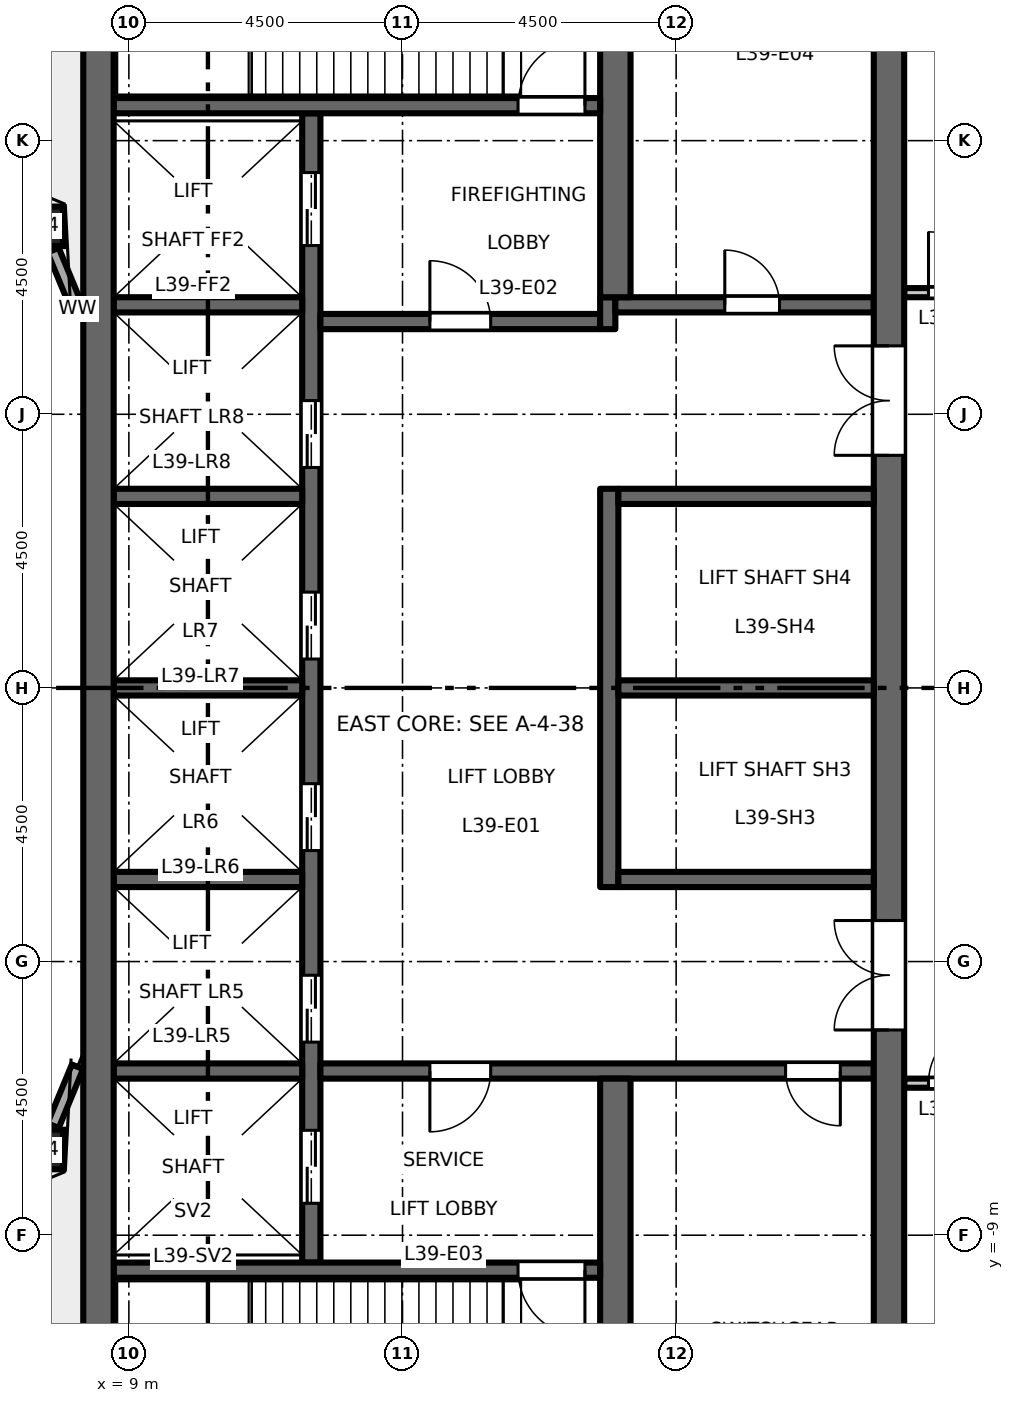
"""IFC4 building model, lengths in metres.
Left out: names, types, materials, properties, quantities, classifications, styles, units other than length and angle.
Written with IfcOpenShell. Run it as: python <this file> out.ifc"""

import sys

from ifc_helpers import new_model, si_unit, direction, frame, frame_2d, origin, origin_2d, place, context, subcontext, project, spatial, rectangle, hollow_rectangle, extrude, element, fill, save


model = new_model("IFC4")
c1 = context("Model", 3, precision=1e-05, world=origin(), true_north=direction((0.0, 1.0)))
c2 = subcontext(c1, "Body", "Model", "MODEL_VIEW")
j1 = project(units=[si_unit("LENGTHUNIT", "METRE"), si_unit("PLANEANGLEUNIT", "RADIAN")], contexts=[c1])
p1 = place(None, origin())
s1 = spatial("IfcSite", under=j1, at=p1, CompositionType="ELEMENT")
p2 = place(p1, origin())
s2 = spatial("IfcBuilding", under=s1, at=p2, CompositionType="ELEMENT")
p3 = place(p2, frame((0.0, 0.0, 181.2)))
s3 = spatial("IfcBuildingStorey", under=s2, at=p3, CompositionType="ELEMENT", Elevation=181.2)
for number, where, z_axis, x_axis in (
    (1, (7.591, -7.591, 0.0), (0.0, 0.0, 1.0), (1.0, 0.0, 0.0)),
    (2, (7.591, 7.591, 0.0), (0.0, 0.0, 1.0), (1.0, 0.0, 0.0)),
):
    element("IfcColumn", number, at=place(p3, frame(where, z_axis=z_axis, x_axis=x_axis)), inside=s3, PredefinedType="COLUMN", context=c2, shape_type="SweptSolid", body=[
        extrude(hollow_rectangle(XDim=0.65, YDim=0.65, WallThickness=0.036, at=origin_2d()), origin(), (0.0, 0.0, 1.0), 6.0),
    ])
p4 = place(p3, frame((12.0, -9.45, 0.0), z_axis=(0.0, 0.0, 1.0), x_axis=(0.0, 1.0, 0.0)))
e3 = element("IfcWall", 3, at=p4, inside=s3, PredefinedType="SHEAR", context=c2, shape_type="SweptSolid", body=[
    extrude(rectangle(XDim=18.9, YDim=0.3, at=frame_2d((9.45, 0.0))), origin(), (0.0, 0.0, 1.0), 5.8),
])
p5 = place(p4, frame((3.625, 0.0, 0.0)))
e4 = element("IfcOpeningElement", 4, at=p5, cuts=e3, PredefinedType="OPENING", context=c2, shape_type="SweptSolid", body=[
    extrude(rectangle(XDim=1.1, YDim=2.1, at=frame_2d((0.55, 1.05))), frame((0.0, 0.16, 0.0), z_axis=(0.0, -1.0, 0.0), x_axis=(1.0, 0.0, 0.0)), (0.0, 0.0, 1.0), 0.32),
])
p6 = place(p4, frame((6.775, 0.0, 0.0)))
e5 = element("IfcOpeningElement", 5, at=p6, cuts=e3, PredefinedType="OPENING", context=c2, shape_type="SweptSolid", body=[
    extrude(rectangle(XDim=1.1, YDim=2.1, at=frame_2d((0.55, 1.05))), frame((0.0, 0.16, 0.0), z_axis=(0.0, -1.0, 0.0), x_axis=(1.0, 0.0, 0.0)), (0.0, 0.0, 1.0), 0.32),
])
p7 = place(p4, frame((9.925, 0.0, 0.0)))
e6 = element("IfcOpeningElement", 6, at=p7, cuts=e3, PredefinedType="OPENING", context=c2, shape_type="SweptSolid", body=[
    extrude(rectangle(XDim=1.1, YDim=2.1, at=frame_2d((0.55, 1.05))), frame((0.0, 0.16, 0.0), z_axis=(0.0, -1.0, 0.0), x_axis=(1.0, 0.0, 0.0)), (0.0, 0.0, 1.0), 0.32),
])
p8 = place(p4, frame((13.075, 0.0, 0.0)))
e7 = element("IfcOpeningElement", 7, at=p8, cuts=e3, PredefinedType="OPENING", context=c2, shape_type="SweptSolid", body=[
    extrude(rectangle(XDim=1.1, YDim=2.1, at=frame_2d((0.55, 1.05))), frame((0.0, 0.16, 0.0), z_axis=(0.0, -1.0, 0.0), x_axis=(1.0, 0.0, 0.0)), (0.0, 0.0, 1.0), 0.32),
])
p9 = place(p4, frame((16.725, 0.0, 0.0)))
e8 = element("IfcOpeningElement", 8, at=p9, cuts=e3, PredefinedType="OPENING", context=c2, shape_type="SweptSolid", body=[
    extrude(rectangle(XDim=1.2, YDim=2.1, at=frame_2d((0.6, 1.05))), frame((0.0, 0.16, 0.0), z_axis=(0.0, -1.0, 0.0), x_axis=(1.0, 0.0, 0.0)), (0.0, 0.0, 1.0), 0.32),
])
p10 = place(p4, frame((0.975, 0.0, 0.0)))
e9 = element("IfcOpeningElement", 9, at=p10, cuts=e3, PredefinedType="OPENING", context=c2, shape_type="SweptSolid", body=[
    extrude(rectangle(XDim=1.2, YDim=2.1, at=frame_2d((0.6, 1.05))), frame((0.0, 0.16, 0.0), z_axis=(0.0, -1.0, 0.0), x_axis=(1.0, 0.0, 0.0)), (0.0, 0.0, 1.0), 0.32),
])
p11 = place(p3, frame((12.15, 6.025, 0.0), z_axis=(0.0, 0.0, 1.0), x_axis=(1.0, 0.0, 0.0)))
e10 = element("IfcWall", 10, at=p11, inside=s3, PredefinedType="SHEAR", context=c2, shape_type="SweptSolid", body=[
    extrude(rectangle(XDim=4.6, YDim=0.25, at=frame_2d((2.3, 0.0))), origin(), (0.0, 0.0, 1.0), 5.8),
])
p12 = place(p11, frame((1.8, 0.0, 0.0)))
e11 = element("IfcOpeningElement", 11, at=p12, cuts=e10, PredefinedType="OPENING", context=c2, shape_type="SweptSolid", body=[
    extrude(rectangle(XDim=1.0, YDim=2.1, at=frame_2d((0.5, 1.05))), frame((0.0, 0.135, 0.0), z_axis=(0.0, -1.0, 0.0), x_axis=(1.0, 0.0, 0.0)), (0.0, 0.0, 1.0), 0.27),
])
p13 = place(p3, frame((16.875, 5.9, 0.0), z_axis=(0.0, 0.0, 1.0), x_axis=(0.0, 1.0, 0.0)))
e12 = element("IfcWall", 12, at=p13, inside=s3, PredefinedType="SHEAR", context=c2, shape_type="SweptSolid", body=[
    extrude(rectangle(XDim=0.525, YDim=0.25, at=frame_2d((0.263, 0.0))), origin(), (0.0, 0.0, 1.0), 5.8),
])
p14 = place(p3, frame((17.0, 6.3, 0.0), z_axis=(0.0, 0.0, 1.0), x_axis=(1.0, 0.0, 0.0)))
e13 = element("IfcWall", 13, at=p14, inside=s3, PredefinedType="SHEAR", context=c2, shape_type="SweptSolid", body=[
    extrude(rectangle(XDim=4.25, YDim=0.25, at=frame_2d((2.125, 0.0))), origin(), (0.0, 0.0, 1.0), 5.8),
])
p15 = place(p14, frame((1.8, 0.0, 0.0)))
e14 = element("IfcOpeningElement", 14, at=p15, cuts=e13, PredefinedType="OPENING", context=c2, shape_type="SweptSolid", body=[
    extrude(rectangle(XDim=0.9, YDim=2.1, at=frame_2d((0.45, 1.05))), frame((0.0, 0.135, 0.0), z_axis=(0.0, -1.0, 0.0), x_axis=(1.0, 0.0, 0.0)), (0.0, 0.0, 1.0), 0.27),
])
p16 = place(p3, frame((12.15, -6.3, 0.0), z_axis=(0.0, 0.0, 1.0), x_axis=(1.0, 0.0, 0.0)))
e15 = element("IfcWall", 15, at=p16, inside=s3, PredefinedType="SHEAR", context=c2, shape_type="SweptSolid", body=[
    extrude(rectangle(XDim=9.1, YDim=0.25, at=frame_2d((4.55, 0.0))), origin(), (0.0, 0.0, 1.0), 5.8),
])
p17 = place(p16, frame((1.8, 0.0, 0.0)))
e16 = element("IfcOpeningElement", 16, at=p17, cuts=e15, PredefinedType="OPENING", context=c2, shape_type="SweptSolid", body=[
    extrude(rectangle(XDim=1.0, YDim=2.1, at=frame_2d((0.5, 1.05))), frame((0.0, 0.135, 0.0), z_axis=(0.0, -1.0, 0.0), x_axis=(1.0, 0.0, 0.0)), (0.0, 0.0, 1.0), 0.27),
])
p18 = place(p16, frame((7.65, 0.0, 0.0)))
e17 = element("IfcOpeningElement", 17, at=p18, cuts=e15, PredefinedType="OPENING", context=c2, shape_type="SweptSolid", body=[
    extrude(rectangle(XDim=0.9, YDim=2.1, at=frame_2d((0.45, 1.05))), frame((0.0, 0.135, 0.0), z_axis=(0.0, -1.0, 0.0), x_axis=(1.0, 0.0, 0.0)), (0.0, 0.0, 1.0), 0.27),
])
p19 = place(p3, frame((21.5, -13.0, 0.0), z_axis=(0.0, 0.0, 1.0), x_axis=(0.0, 1.0, 0.0)))
e18 = element("IfcWall", 18, at=p19, inside=s3, PredefinedType="SHEAR", context=c2, shape_type="SweptSolid", body=[
    extrude(rectangle(XDim=26.0, YDim=0.5, at=frame_2d((13.0, 0.0))), origin(), (0.0, 0.0, 1.0), 5.8),
])
p20 = place(p19, frame((16.825, 0.0, 0.0)))
e19 = element("IfcOpeningElement", 19, at=p20, cuts=e18, PredefinedType="OPENING", context=c2, shape_type="SweptSolid", body=[
    extrude(rectangle(XDim=1.8, YDim=2.1, at=frame_2d((0.9, 1.05))), frame((0.0, 0.26, 0.0), z_axis=(0.0, -1.0, 0.0), x_axis=(1.0, 0.0, 0.0)), (0.0, 0.0, 1.0), 0.52),
])
p21 = place(p19, frame((7.375, 0.0, 0.0)))
e20 = element("IfcOpeningElement", 20, at=p21, cuts=e18, PredefinedType="OPENING", context=c2, shape_type="SweptSolid", body=[
    extrude(rectangle(XDim=1.8, YDim=2.1, at=frame_2d((0.9, 1.05))), frame((0.0, 0.26, 0.0), z_axis=(0.0, -1.0, 0.0), x_axis=(1.0, 0.0, 0.0)), (0.0, 0.0, 1.0), 0.52),
])
p22 = place(p3, frame((16.9, -3.275, 0.0), z_axis=(0.0, 0.0, 1.0), x_axis=(0.0, 1.0, 0.0)))
e21 = element("IfcWall", 21, at=p22, inside=s3, PredefinedType="SHEAR", context=c2, shape_type="SweptSolid", body=[
    extrude(rectangle(XDim=6.55, YDim=0.3, at=frame_2d((3.275, 0.0))), origin(), (0.0, 0.0, 1.0), 5.8),
])
for number, where, z_axis, x_axis in (
    (22, (17.05, 0.0, 0.0), (0.0, 0.0, 1.0), (1.0, 0.0, 0.0)),
    (23, (17.05, 3.15, 0.0), (0.0, 0.0, 1.0), (1.0, 0.0, 0.0)),
    (24, (17.05, -3.15, 0.0), (0.0, 0.0, 1.0), (1.0, 0.0, 0.0)),
):
    element("IfcWall", number, at=place(p3, frame(where, z_axis=z_axis, x_axis=x_axis)), inside=s3, PredefinedType="SHEAR", context=c2, shape_type="SweptSolid", body=[
        extrude(rectangle(XDim=4.2, YDim=0.25, at=frame_2d((2.1, 0.0))), origin(), (0.0, 0.0, 1.0), 5.8),
    ])
for number, where, z_axis, x_axis in (
    (25, (17.0, 6.425, 0.0), (0.0, 0.0, 1.0), (0.0, 1.0, 0.0)),
    (26, (17.0, -13.0, 0.0), (0.0, 0.0, 1.0), (0.0, 1.0, 0.0)),
):
    element("IfcWall", number, at=place(p3, frame(where, z_axis=z_axis, x_axis=x_axis)), inside=s3, PredefinedType="SHEAR", context=c2, shape_type="SweptSolid", body=[
        extrude(rectangle(XDim=6.575, YDim=0.5, at=frame_2d((3.288, 0.0))), origin(), (0.0, 0.0, 1.0), 5.8),
    ])
for number, where, z_axis, x_axis in (
    (27, (8.75, 0.0, 0.0), (0.0, 0.0, 1.0), (1.0, 0.0, 0.0)),
    (28, (8.75, 3.15, 0.0), (0.0, 0.0, 1.0), (1.0, 0.0, 0.0)),
    (29, (8.75, 6.3, 0.0), (0.0, 0.0, 1.0), (1.0, 0.0, 0.0)),
    (30, (8.75, -3.15, 0.0), (0.0, 0.0, 1.0), (1.0, 0.0, 0.0)),
    (31, (8.75, -6.3, 0.0), (0.0, 0.0, 1.0), (1.0, 0.0, 0.0)),
):
    element("IfcWall", number, at=place(p3, frame(where, z_axis=z_axis, x_axis=x_axis)), inside=s3, PredefinedType="SHEAR", context=c2, shape_type="SweptSolid", body=[
        extrude(rectangle(XDim=3.1, YDim=0.25, at=frame_2d((1.55, 0.0))), origin(), (0.0, 0.0, 1.0), 5.8),
    ])
p23 = place(p3, frame((8.75, 9.575, 0.0), z_axis=(0.0, 0.0, 1.0), x_axis=(1.0, 0.0, 0.0)))
e32 = element("IfcWall", 32, at=p23, inside=s3, PredefinedType="SHEAR", context=c2, shape_type="SweptSolid", body=[
    extrude(rectangle(XDim=8.0, YDim=0.25, at=frame_2d((4.0, 0.0))), origin(), (0.0, 0.0, 1.0), 5.8),
])
p24 = place(p23, frame((6.65, 0.0, 0.0)))
e33 = element("IfcOpeningElement", 33, at=p24, cuts=e32, PredefinedType="OPENING", context=c2, shape_type="SweptSolid", body=[
    extrude(rectangle(XDim=1.1, YDim=2.1, at=frame_2d((0.55, 1.05))), frame((0.0, 0.135, 0.0), z_axis=(0.0, -1.0, 0.0), x_axis=(1.0, 0.0, 0.0)), (0.0, 0.0, 1.0), 0.27),
])
p25 = place(p3, frame((8.75, -9.575, 0.0), z_axis=(0.0, 0.0, 1.0), x_axis=(1.0, 0.0, 0.0)))
e34 = element("IfcWall", 34, at=p25, inside=s3, PredefinedType="SHEAR", context=c2, shape_type="SweptSolid", body=[
    extrude(rectangle(XDim=8.0, YDim=0.25, at=frame_2d((4.0, 0.0))), origin(), (0.0, 0.0, 1.0), 5.8),
])
p26 = place(p25, frame((6.65, 0.0, 0.0)))
e35 = element("IfcOpeningElement", 35, at=p26, cuts=e34, PredefinedType="OPENING", context=c2, shape_type="SweptSolid", body=[
    extrude(rectangle(XDim=1.1, YDim=2.1, at=frame_2d((0.55, 1.05))), frame((0.0, 0.135, 0.0), z_axis=(0.0, -1.0, 0.0), x_axis=(1.0, 0.0, 0.0)), (0.0, 0.0, 1.0), 0.27),
])
p27 = place(p3, frame((8.5, -13.0, 0.0), z_axis=(0.0, 0.0, 1.0), x_axis=(0.0, 1.0, 0.0)))
e36 = element("IfcWall", 36, at=p27, inside=s3, PredefinedType="SHEAR", context=c2, shape_type="SweptSolid", body=[
    extrude(rectangle(XDim=26.0, YDim=0.5, at=frame_2d((13.0, 0.0))), origin(), (0.0, 0.0, 1.0), 5.8),
])
for number, where, z_axis, x_axis in (
    (37, (7.753, -7.199, 0.0), (0.0, 0.0, 1.0), (0.383, 0.924, 0.0)),
    (38, (8.154, 6.231, 0.0), (0.0, 0.0, 1.0), (-0.383, 0.924, 0.0)),
):
    element("IfcWall", number, at=place(p3, frame(where, z_axis=z_axis, x_axis=x_axis)), inside=s3, PredefinedType="STANDARD", context=c2, shape_type="SweptSolid", body=[
        extrude(rectangle(XDim=1.048, YDim=0.2, at=frame_2d((0.524, 0.0))), origin(), (0.0, 0.0, 1.0), 5.368),
    ])
p28 = place(p3, frame((21.75, -6.5, 0.0), z_axis=(0.0, 0.0, 1.0), x_axis=(1.0, 0.0, 0.0)))
e39 = element("IfcWall", 39, at=p28, inside=s3, PredefinedType="PARTITIONING", context=c2, shape_type="SweptSolid", body=[
    extrude(rectangle(XDim=4.575, YDim=0.15, at=frame_2d((2.288, 0.0))), origin(), (0.0, 0.0, 1.0), 5.8),
])
p29 = place(p28, frame((0.4, 0.0, 0.0)))
e40 = element("IfcOpeningElement", 40, at=p29, cuts=e39, PredefinedType="OPENING", context=c2, shape_type="SweptSolid", body=[
    extrude(rectangle(XDim=1.0, YDim=2.1, at=frame_2d((0.5, 1.05))), frame((0.0, 0.085, 0.0), z_axis=(0.0, -1.0, 0.0), x_axis=(1.0, 0.0, 0.0)), (0.0, 0.0, 1.0), 0.17),
])
p30 = place(p3, frame((21.75, 6.5, 0.0), z_axis=(0.0, 0.0, 1.0), x_axis=(1.0, 0.0, 0.0)))
e41 = element("IfcWall", 41, at=p30, inside=s3, PredefinedType="PARTITIONING", context=c2, shape_type="SweptSolid", body=[
    extrude(rectangle(XDim=4.575, YDim=0.15, at=frame_2d((2.288, 0.0))), origin(), (0.0, 0.0, 1.0), 5.8),
])
p31 = place(p30, frame((0.4, 0.0, 0.0)))
e42 = element("IfcOpeningElement", 42, at=p31, cuts=e41, PredefinedType="OPENING", context=c2, shape_type="SweptSolid", body=[
    extrude(rectangle(XDim=1.0, YDim=2.1, at=frame_2d((0.5, 1.05))), frame((0.0, 0.085, 0.0), z_axis=(0.0, -1.0, 0.0), x_axis=(1.0, 0.0, 0.0)), (0.0, 0.0, 1.0), 0.17),
])
p32 = place(p12, origin())
e43 = element("IfcDoor", 43, at=p32, inside=s3, OperationType="SINGLE_SWING_RIGHT", PredefinedType="DOOR", context=c2, shape_type="SweptSolid", body=[
    extrude(rectangle(XDim=1.0, YDim=2.1, at=frame_2d((0.5, 1.05))), frame((0.0, 0.025, 0.0), z_axis=(0.0, -1.0, 0.0), x_axis=(1.0, 0.0, 0.0)), (0.0, 0.0, 1.0), 0.05),
])
fill(e11, e43)
p33 = place(p17, origin())
e44 = element("IfcDoor", 44, at=p33, inside=s3, OperationType="SINGLE_SWING_LEFT", PredefinedType="DOOR", context=c2, shape_type="SweptSolid", body=[
    extrude(rectangle(XDim=1.0, YDim=2.1, at=frame_2d((0.5, 1.05))), frame((0.0, 0.025, 0.0), z_axis=(0.0, -1.0, 0.0), x_axis=(1.0, 0.0, 0.0)), (0.0, 0.0, 1.0), 0.05),
])
fill(e16, e44)
p34 = place(p24, origin())
e45 = element("IfcDoor", 45, at=p34, inside=s3, OperationType="SINGLE_SWING_LEFT", PredefinedType="DOOR", context=c2, shape_type="SweptSolid", body=[
    extrude(rectangle(XDim=1.1, YDim=2.1, at=frame_2d((0.55, 1.05))), frame((0.0, 0.025, 0.0), z_axis=(0.0, -1.0, 0.0), x_axis=(1.0, 0.0, 0.0)), (0.0, 0.0, 1.0), 0.05),
])
fill(e33, e45)
p35 = place(p26, origin())
e46 = element("IfcDoor", 46, at=p35, inside=s3, OperationType="SINGLE_SWING_RIGHT", PredefinedType="DOOR", context=c2, shape_type="SweptSolid", body=[
    extrude(rectangle(XDim=1.1, YDim=2.1, at=frame_2d((0.55, 1.05))), frame((0.0, 0.025, 0.0), z_axis=(0.0, -1.0, 0.0), x_axis=(1.0, 0.0, 0.0)), (0.0, 0.0, 1.0), 0.05),
])
fill(e35, e46)
p36 = place(p20, origin())
e47 = element("IfcDoor", 47, at=p36, inside=s3, OperationType="DOUBLE_DOOR_DOUBLE_SWING", PredefinedType="DOOR", context=c2, shape_type="SweptSolid", body=[
    extrude(rectangle(XDim=1.8, YDim=2.1, at=frame_2d((0.9, 1.05))), frame((0.0, 0.025, 0.0), z_axis=(0.0, -1.0, 0.0), x_axis=(1.0, 0.0, 0.0)), (0.0, 0.0, 1.0), 0.05),
])
fill(e19, e47)
p37 = place(p21, origin())
e48 = element("IfcDoor", 48, at=p37, inside=s3, OperationType="DOUBLE_DOOR_DOUBLE_SWING", PredefinedType="DOOR", context=c2, shape_type="SweptSolid", body=[
    extrude(rectangle(XDim=1.8, YDim=2.1, at=frame_2d((0.9, 1.05))), frame((0.0, 0.025, 0.0), z_axis=(0.0, -1.0, 0.0), x_axis=(1.0, 0.0, 0.0)), (0.0, 0.0, 1.0), 0.05),
])
fill(e20, e48)
p38 = place(p5, origin())
e49 = element("IfcDoor", 49, at=p38, inside=s3, OperationType="DOUBLE_DOOR_SLIDING", PredefinedType="DOOR", context=c2, shape_type="SweptSolid", body=[
    extrude(rectangle(XDim=1.1, YDim=2.1, at=frame_2d((0.55, 1.05))), frame((0.0, 0.025, 0.0), z_axis=(0.0, -1.0, 0.0), x_axis=(1.0, 0.0, 0.0)), (0.0, 0.0, 1.0), 0.05),
])
fill(e4, e49)
p39 = place(p6, origin())
e50 = element("IfcDoor", 50, at=p39, inside=s3, OperationType="DOUBLE_DOOR_SLIDING", PredefinedType="DOOR", context=c2, shape_type="SweptSolid", body=[
    extrude(rectangle(XDim=1.1, YDim=2.1, at=frame_2d((0.55, 1.05))), frame((0.0, 0.025, 0.0), z_axis=(0.0, -1.0, 0.0), x_axis=(1.0, 0.0, 0.0)), (0.0, 0.0, 1.0), 0.05),
])
fill(e5, e50)
p40 = place(p7, origin())
e51 = element("IfcDoor", 51, at=p40, inside=s3, OperationType="DOUBLE_DOOR_SLIDING", PredefinedType="DOOR", context=c2, shape_type="SweptSolid", body=[
    extrude(rectangle(XDim=1.1, YDim=2.1, at=frame_2d((0.55, 1.05))), frame((0.0, 0.025, 0.0), z_axis=(0.0, -1.0, 0.0), x_axis=(1.0, 0.0, 0.0)), (0.0, 0.0, 1.0), 0.05),
])
fill(e6, e51)
p41 = place(p8, origin())
e52 = element("IfcDoor", 52, at=p41, inside=s3, OperationType="DOUBLE_DOOR_SLIDING", PredefinedType="DOOR", context=c2, shape_type="SweptSolid", body=[
    extrude(rectangle(XDim=1.1, YDim=2.1, at=frame_2d((0.55, 1.05))), frame((0.0, 0.025, 0.0), z_axis=(0.0, -1.0, 0.0), x_axis=(1.0, 0.0, 0.0)), (0.0, 0.0, 1.0), 0.05),
])
fill(e7, e52)
p42 = place(p9, origin())
e53 = element("IfcDoor", 53, at=p42, inside=s3, OperationType="DOUBLE_DOOR_SLIDING", PredefinedType="DOOR", context=c2, shape_type="SweptSolid", body=[
    extrude(rectangle(XDim=1.2, YDim=2.1, at=frame_2d((0.6, 1.05))), frame((0.0, 0.025, 0.0), z_axis=(0.0, -1.0, 0.0), x_axis=(1.0, 0.0, 0.0)), (0.0, 0.0, 1.0), 0.05),
])
fill(e8, e53)
p43 = place(p10, origin())
e54 = element("IfcDoor", 54, at=p43, inside=s3, OperationType="DOUBLE_DOOR_SLIDING", PredefinedType="DOOR", context=c2, shape_type="SweptSolid", body=[
    extrude(rectangle(XDim=1.2, YDim=2.1, at=frame_2d((0.6, 1.05))), frame((0.0, 0.025, 0.0), z_axis=(0.0, -1.0, 0.0), x_axis=(1.0, 0.0, 0.0)), (0.0, 0.0, 1.0), 0.05),
])
fill(e9, e54)
p44 = place(p15, origin())
e55 = element("IfcDoor", 55, at=p44, inside=s3, OperationType="SINGLE_SWING_RIGHT", PredefinedType="DOOR", context=c2, shape_type="SweptSolid", body=[
    extrude(rectangle(XDim=0.9, YDim=2.1, at=frame_2d((0.45, 1.05))), frame((0.0, 0.025, 0.0), z_axis=(0.0, -1.0, 0.0), x_axis=(1.0, 0.0, 0.0)), (0.0, 0.0, 1.0), 0.05),
])
fill(e14, e55)
p45 = place(p18, origin())
e56 = element("IfcDoor", 56, at=p45, inside=s3, OperationType="SINGLE_SWING_RIGHT", PredefinedType="DOOR", context=c2, shape_type="SweptSolid", body=[
    extrude(rectangle(XDim=0.9, YDim=2.1, at=frame_2d((0.45, 1.05))), frame((0.0, 0.025, 0.0), z_axis=(0.0, -1.0, 0.0), x_axis=(1.0, 0.0, 0.0)), (0.0, 0.0, 1.0), 0.05),
])
fill(e17, e56)
p46 = place(p31, origin())
e57 = element("IfcDoor", 57, at=p46, inside=s3, OperationType="SINGLE_SWING_LEFT", PredefinedType="DOOR", context=c2, shape_type="SweptSolid", body=[
    extrude(rectangle(XDim=1.0, YDim=2.1, at=frame_2d((0.5, 1.05))), frame((0.0, 0.025, 0.0), z_axis=(0.0, -1.0, 0.0), x_axis=(1.0, 0.0, 0.0)), (0.0, 0.0, 1.0), 0.05),
])
fill(e42, e57)
p47 = place(p29, origin())
e58 = element("IfcDoor", 58, at=p47, inside=s3, OperationType="SINGLE_SWING_RIGHT", PredefinedType="DOOR", context=c2, shape_type="SweptSolid", body=[
    extrude(rectangle(XDim=1.0, YDim=2.1, at=frame_2d((0.5, 1.05))), frame((0.0, 0.025, 0.0), z_axis=(0.0, -1.0, 0.0), x_axis=(1.0, 0.0, 0.0)), (0.0, 0.0, 1.0), 0.05),
])
fill(e40, e58)
save(model, sys.argv[1])
